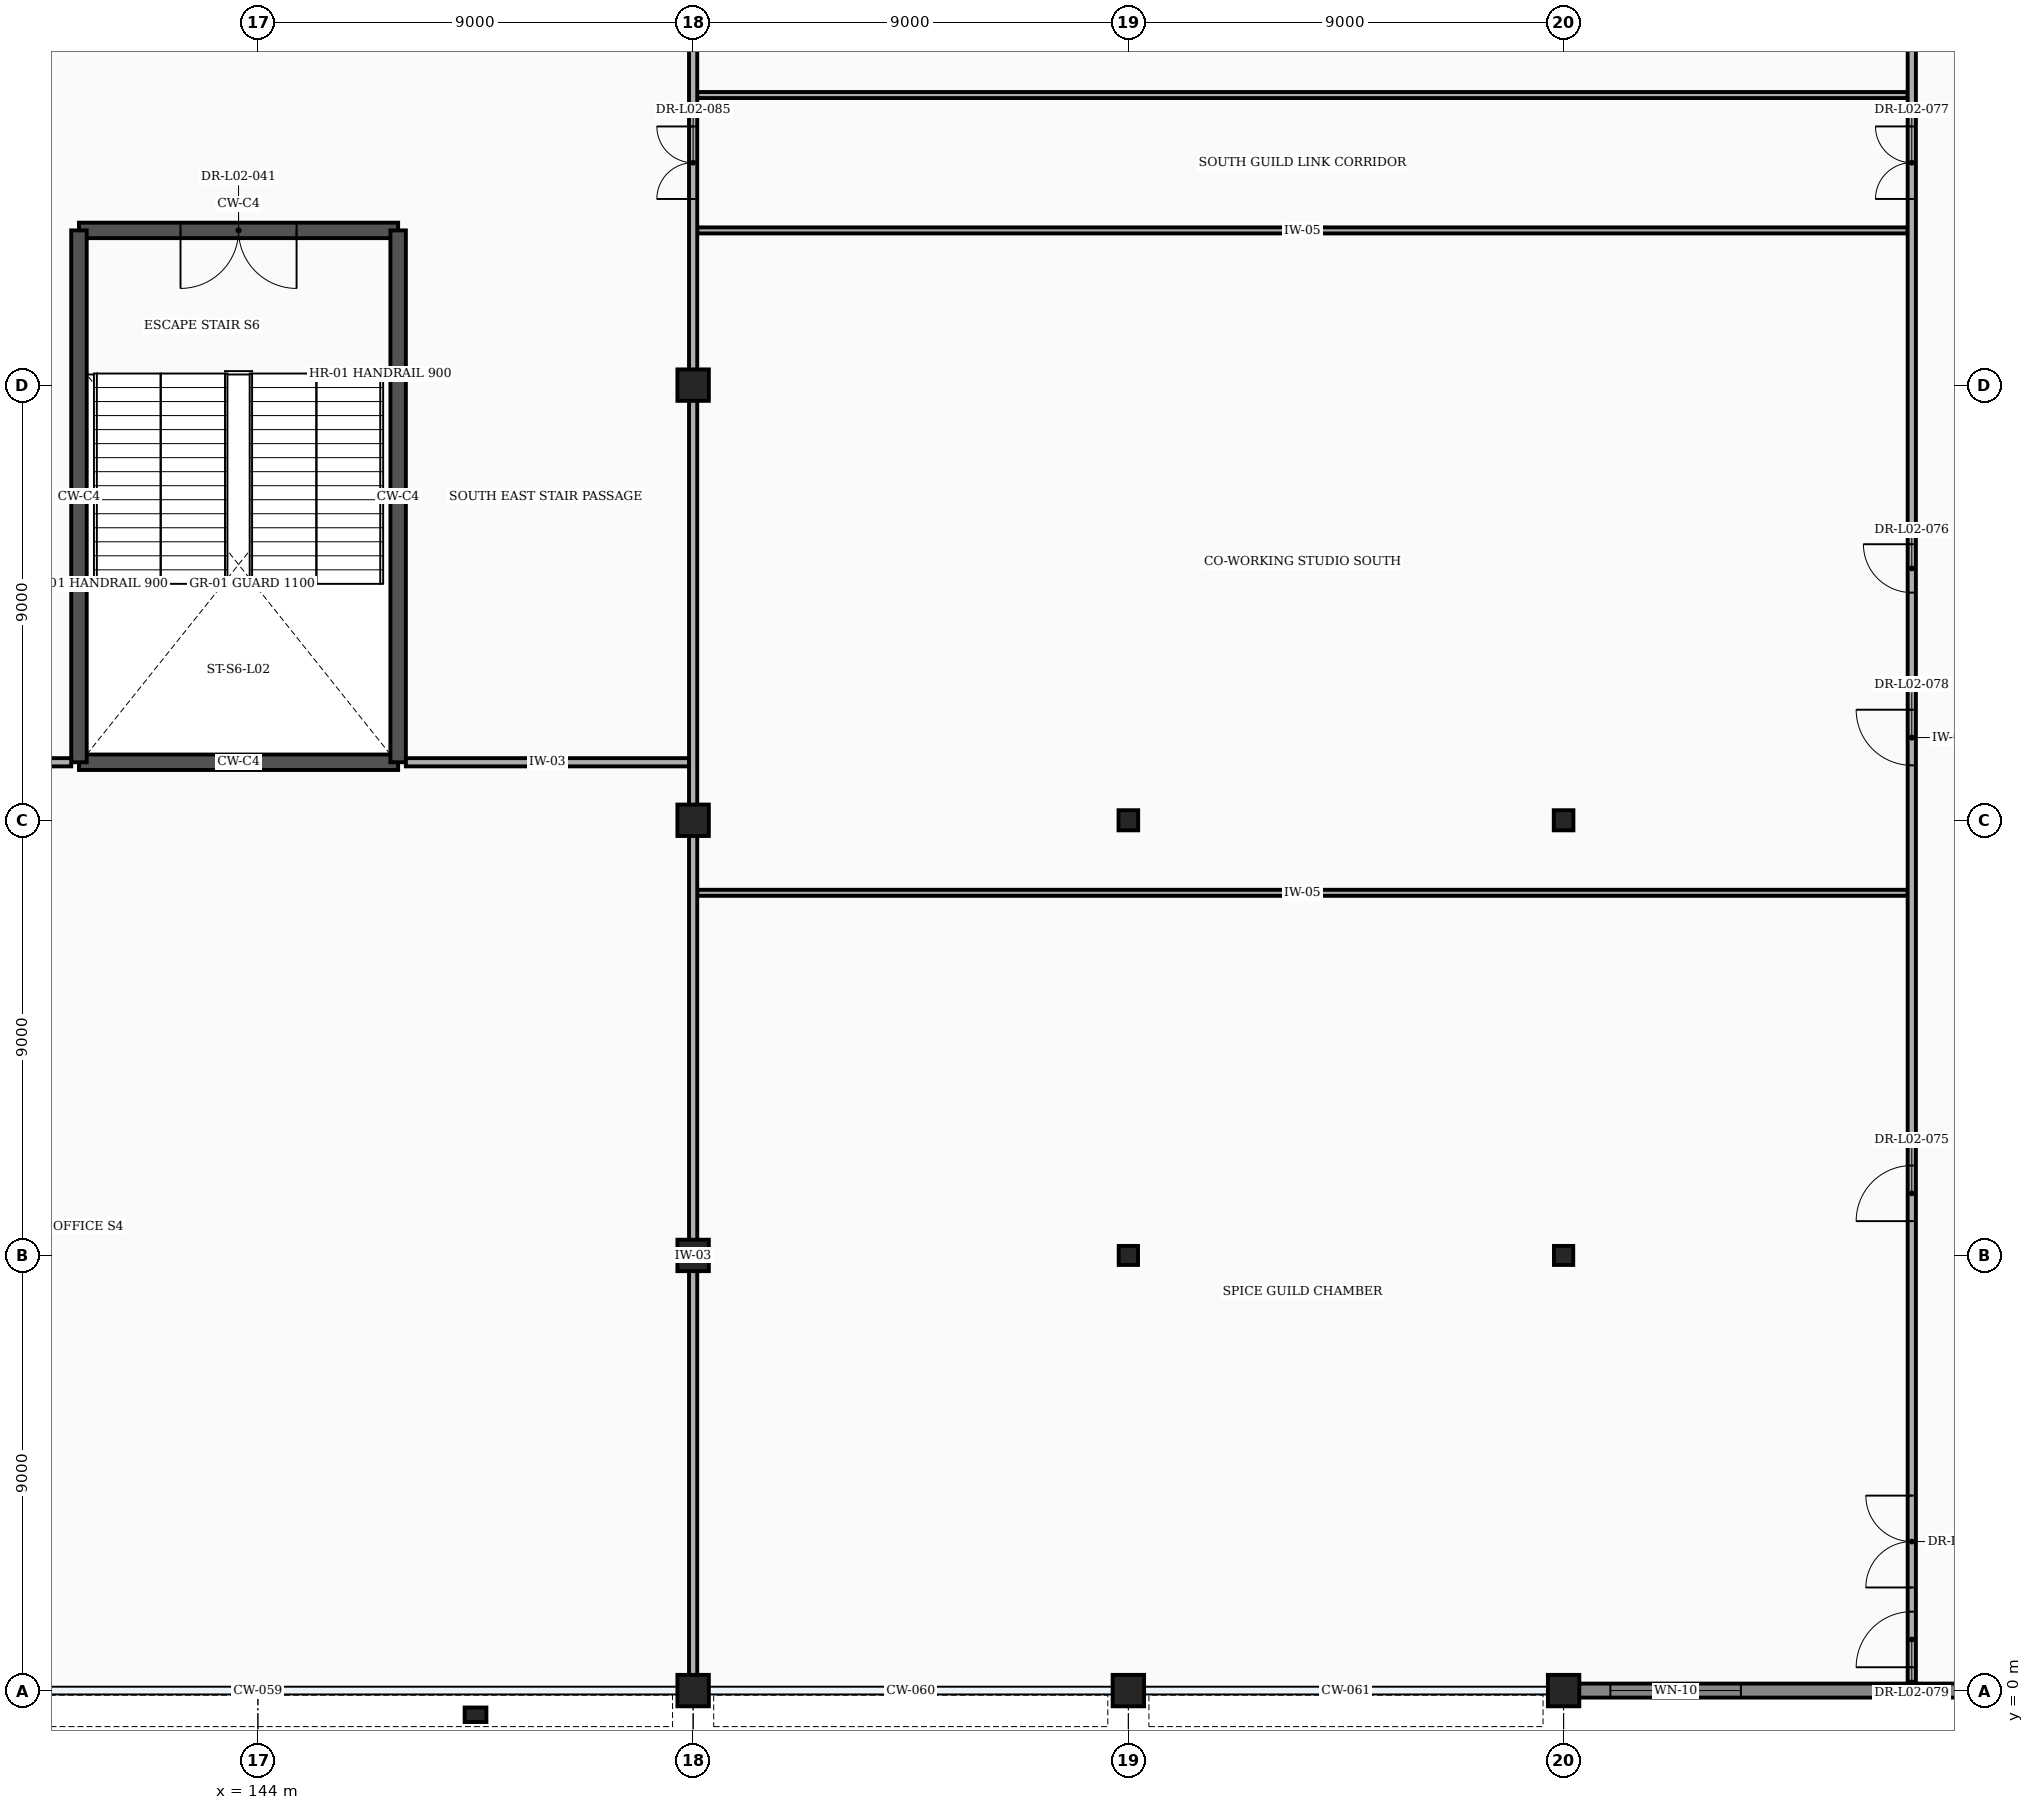
"""IFC4 building model, lengths in metres.
Left out: names, types, materials, properties, quantities, classifications, styles, units other than length and angle.
Written with IfcOpenShell. Run it as: python <this file> out.ifc"""

import sys

from ifc_helpers import new_model, si_unit, direction, frame, frame_2d, origin, origin_2d, place, context, subcontext, project, spatial, rectangle, i_section, extrude, element, fill, save


model = new_model("IFC4")
c1 = context("Model", 3, precision=1e-05, world=origin(), true_north=direction((0.0, 1.0)))
c2 = subcontext(c1, "Body", "Model", "MODEL_VIEW")
j1 = project(units=[si_unit("LENGTHUNIT", "METRE"), si_unit("PLANEANGLEUNIT", "RADIAN")], contexts=[c1])
p1 = place(None, origin())
s1 = spatial("IfcSite", under=j1, at=p1, CompositionType="ELEMENT")
p2 = place(p1, origin())
s2 = spatial("IfcBuilding", under=s1, at=p2, CompositionType="ELEMENT")
p3 = place(p2, frame((0.0, 0.0, 11.4)))
s3 = spatial("IfcBuildingStorey", under=s2, at=p3, CompositionType="ELEMENT", Elevation=11.4)
for number, where, z_axis, x_axis in (
    (1, (153.0, 0.0, 0.0), (0.0, 0.0, 1.0), (1.0, 0.0, 0.0)),
    (2, (153.0, 9.0, 0.0), (0.0, 0.0, 1.0), (1.0, 0.0, 0.0)),
    (3, (153.0, 18.0, 0.0), (0.0, 0.0, 1.0), (1.0, 0.0, 0.0)),
    (4, (153.0, 27.0, 0.0), (0.0, 0.0, 1.0), (1.0, 0.0, 0.0)),
    (5, (162.0, 0.0, 0.0), (0.0, 0.0, 1.0), (1.0, 0.0, 0.0)),
):
    element("IfcColumn", number, at=place(p3, frame(where, z_axis=z_axis, x_axis=x_axis)), inside=s3, PredefinedType="COLUMN", context=c2, shape_type="SweptSolid", body=[
        extrude(rectangle(XDim=0.65, YDim=0.65, at=origin_2d()), origin(), (0.0, 0.0, 1.0), 5.4),
    ])
p4 = place(p3, frame((162.0, 9.0, 0.0), z_axis=(0.0, 0.0, 1.0), x_axis=(1.0, 0.0, 0.0)))
e6 = element("IfcColumn", 6, at=p4, inside=s3, PredefinedType="COLUMN", context=c2, shape_type="SweptSolid", body=[
    extrude(i_section(OverallWidth=0.399, OverallDepth=0.394, WebThickness=0.023, FlangeThickness=0.037, at=origin_2d()), origin(), (0.0, 0.0, 1.0), 5.4),
])
p5 = place(p3, frame((162.0, 18.0, 0.0), z_axis=(0.0, 0.0, 1.0), x_axis=(1.0, 0.0, 0.0)))
e7 = element("IfcColumn", 7, at=p5, inside=s3, PredefinedType="COLUMN", context=c2, shape_type="SweptSolid", body=[
    extrude(i_section(OverallWidth=0.406, OverallDepth=0.416, WebThickness=0.03, FlangeThickness=0.048, at=origin_2d()), origin(), (0.0, 0.0, 1.0), 5.4),
])
p6 = place(p3, frame((171.0, 0.0, 0.0), z_axis=(0.0, 0.0, 1.0), x_axis=(1.0, 0.0, 0.0)))
e8 = element("IfcColumn", 8, at=p6, inside=s3, PredefinedType="COLUMN", context=c2, shape_type="SweptSolid", body=[
    extrude(rectangle(XDim=0.65, YDim=0.65, at=origin_2d()), origin(), (0.0, 0.0, 1.0), 5.4),
])
p7 = place(p3, frame((171.0, 9.0, 0.0), z_axis=(0.0, 0.0, 1.0), x_axis=(1.0, 0.0, 0.0)))
e9 = element("IfcColumn", 9, at=p7, inside=s3, PredefinedType="COLUMN", context=c2, shape_type="SweptSolid", body=[
    extrude(i_section(OverallWidth=0.399, OverallDepth=0.394, WebThickness=0.023, FlangeThickness=0.037, at=origin_2d()), origin(), (0.0, 0.0, 1.0), 5.4),
])
p8 = place(p3, frame((171.0, 18.0, 0.0), z_axis=(0.0, 0.0, 1.0), x_axis=(1.0, 0.0, 0.0)))
e10 = element("IfcColumn", 10, at=p8, inside=s3, PredefinedType="COLUMN", context=c2, shape_type="SweptSolid", body=[
    extrude(i_section(OverallWidth=0.406, OverallDepth=0.416, WebThickness=0.03, FlangeThickness=0.048, at=origin_2d()), origin(), (0.0, 0.0, 1.0), 5.4),
])
p9 = place(p3, frame((148.5, -0.5, 0.0), z_axis=(0.0, 0.0, 1.0), x_axis=(1.0, 0.0, 0.0)))
e11 = element("IfcColumn", 11, at=p9, inside=s3, PredefinedType="PILASTER", context=c2, shape_type="SweptSolid", body=[
    extrude(rectangle(XDim=0.45, YDim=0.3, at=origin_2d()), origin(), (0.0, 0.0, 1.0), 5.4),
])
p10 = place(p3, frame((171.317, 0.0, 0.0), z_axis=(0.0, 0.0, 1.0), x_axis=(1.0, 0.0, 0.0)))
e12 = element("IfcWall", 12, at=p10, inside=s3, PredefinedType="STANDARD", context=c2, shape_type="SweptSolid", body=[
    extrude(rectangle(XDim=17.366, YDim=0.29, at=frame_2d((8.683, 0.0))), origin(), (0.0, 0.0, 1.0), 4.388),
])
p11 = place(p10, frame((0.65, 0.0, 0.85)))
e13 = element("IfcOpeningElement", 13, at=p11, cuts=e12, PredefinedType="OPENING", context=c2, shape_type="SweptSolid", body=[
    extrude(rectangle(XDim=2.7, YDim=2.4, at=frame_2d((1.35, 1.2))), frame((0.0, 0.157, 0.0), z_axis=(0.0, -1.0, 0.0), x_axis=(1.0, 0.0, 0.0)), (0.0, 0.0, 1.0), 0.314),
])
p12 = place(p3, frame((140.3, 19.2, 0.0), z_axis=(0.0, 0.0, 1.0), x_axis=(1.0, 0.0, 0.0)))
e14 = element("IfcWall", 14, at=p12, inside=s3, PredefinedType="SHEAR", context=c2, shape_type="SweptSolid", body=[
    extrude(rectangle(XDim=6.6, YDim=0.32, at=frame_2d((3.3, 0.0))), origin(), (0.0, 0.0, 1.0), 5.15),
])
p13 = place(p3, frame((140.3, 30.2, 0.0), z_axis=(0.0, 0.0, 1.0), x_axis=(1.0, 0.0, 0.0)))
e15 = element("IfcWall", 15, at=p13, inside=s3, PredefinedType="SHEAR", context=c2, shape_type="SweptSolid", body=[
    extrude(rectangle(XDim=6.6, YDim=0.32, at=frame_2d((3.3, 0.0))), origin(), (0.0, 0.0, 1.0), 5.15),
])
p14 = place(p13, frame((2.1, 0.0, 0.0)))
e16 = element("IfcOpeningElement", 16, at=p14, cuts=e15, PredefinedType="OPENING", context=c2, shape_type="SweptSolid", body=[
    extrude(rectangle(XDim=2.4, YDim=2.25, at=frame_2d((1.2, 1.125))), frame((0.0, 0.172, 0.0), z_axis=(0.0, -1.0, 0.0), x_axis=(1.0, 0.0, 0.0)), (0.0, 0.0, 1.0), 0.344),
])
for number, where, z_axis, x_axis in (
    (17, (140.3, 19.2, 0.0), (0.0, 0.0, 1.0), (0.0, 1.0, 0.0)),
    (18, (146.9, 19.2, 0.0), (0.0, 0.0, 1.0), (0.0, 1.0, 0.0)),
):
    element("IfcWall", number, at=place(p3, frame(where, z_axis=z_axis, x_axis=x_axis)), inside=s3, PredefinedType="SHEAR", context=c2, shape_type="SweptSolid", body=[
        extrude(rectangle(XDim=11.0, YDim=0.32, at=frame_2d((5.5, 0.0))), origin(), (0.0, 0.0, 1.0), 5.15),
    ])
for number, where, z_axis, x_axis in (
    (19, (153.085, 16.5, 0.0), (0.0, 0.0, 1.0), (1.0, 0.0, 0.0)),
    (20, (153.085, 30.2, 0.0), (0.0, 0.0, 1.0), (1.0, 0.0, 0.0)),
    (21, (153.085, 33.0, 0.0), (0.0, 0.0, 1.0), (1.0, 0.0, 0.0)),
):
    element("IfcWall", number, at=place(p3, frame(where, z_axis=z_axis, x_axis=x_axis)), inside=s3, PredefinedType="PARTITIONING", context=c2, shape_type="SweptSolid", body=[
        extrude(rectangle(XDim=25.03, YDim=0.125, at=frame_2d((12.515, 0.0))), origin(), (0.0, 0.0, 1.0), 5.15),
    ])
p15 = place(p3, frame((178.2, 0.183, 0.0), z_axis=(0.0, 0.0, 1.0), x_axis=(0.0, 1.0, 0.0)))
e22 = element("IfcWall", 22, at=p15, inside=s3, PredefinedType="PARTITIONING", context=c2, shape_type="SweptSolid", body=[
    extrude(rectangle(XDim=39.057, YDim=0.17, at=frame_2d((19.529, 0.0))), origin(), (0.0, 0.0, 1.0), 5.15),
])
p16 = place(p15, frame((9.527, 0.0, 0.0)))
e23 = element("IfcOpeningElement", 23, at=p16, cuts=e22, PredefinedType="OPENING", context=c2, shape_type="SweptSolid", body=[
    extrude(rectangle(XDim=1.15, YDim=2.15, at=frame_2d((0.575, 1.075))), frame((0.0, 0.097, 0.0), z_axis=(0.0, -1.0, 0.0), x_axis=(1.0, 0.0, 0.0)), (0.0, 0.0, 1.0), 0.194),
])
p17 = place(p15, frame((22.527, 0.0, 0.0)))
e24 = element("IfcOpeningElement", 24, at=p17, cuts=e22, PredefinedType="OPENING", context=c2, shape_type="SweptSolid", body=[
    extrude(rectangle(XDim=1.0, YDim=2.15, at=frame_2d((0.5, 1.075))), frame((0.0, 0.097, 0.0), z_axis=(0.0, -1.0, 0.0), x_axis=(1.0, 0.0, 0.0)), (0.0, 0.0, 1.0), 0.194),
])
p18 = place(p15, frame((30.668, 0.0, 0.0)))
e25 = element("IfcOpeningElement", 25, at=p18, cuts=e22, PredefinedType="OPENING", context=c2, shape_type="SweptSolid", body=[
    extrude(rectangle(XDim=1.5, YDim=2.2, at=frame_2d((0.75, 1.1))), frame((0.0, 0.097, 0.0), z_axis=(0.0, -1.0, 0.0), x_axis=(1.0, 0.0, 0.0)), (0.0, 0.0, 1.0), 0.194),
])
p19 = place(p15, frame((18.954, 0.0, 0.0)))
e26 = element("IfcOpeningElement", 26, at=p19, cuts=e22, PredefinedType="OPENING", context=c2, shape_type="SweptSolid", body=[
    extrude(rectangle(XDim=1.15, YDim=2.15, at=frame_2d((0.575, 1.075))), frame((0.0, 0.097, 0.0), z_axis=(0.0, -1.0, 0.0), x_axis=(1.0, 0.0, 0.0)), (0.0, 0.0, 1.0), 0.194),
])
p20 = place(p15, frame((0.3, 0.0, 0.0)))
e27 = element("IfcOpeningElement", 27, at=p20, cuts=e22, PredefinedType="OPENING", context=c2, shape_type="SweptSolid", body=[
    extrude(rectangle(XDim=1.15, YDim=2.15, at=frame_2d((0.575, 1.075))), frame((0.0, 0.097, 0.0), z_axis=(0.0, -1.0, 0.0), x_axis=(1.0, 0.0, 0.0)), (0.0, 0.0, 1.0), 0.194),
])
p21 = place(p15, frame((37.758, 0.0, 0.0)))
e28 = element("IfcOpeningElement", 28, at=p21, cuts=e22, PredefinedType="OPENING", context=c2, shape_type="SweptSolid", body=[
    extrude(rectangle(XDim=1.0, YDim=2.15, at=frame_2d((0.5, 1.075))), frame((0.0, 0.097, 0.0), z_axis=(0.0, -1.0, 0.0), x_axis=(1.0, 0.0, 0.0)), (0.0, 0.0, 1.0), 0.194),
])
p22 = place(p15, frame((1.95, 0.0, 0.0)))
e29 = element("IfcOpeningElement", 29, at=p22, cuts=e22, PredefinedType="OPENING", context=c2, shape_type="SweptSolid", body=[
    extrude(rectangle(XDim=1.9, YDim=2.35, at=frame_2d((0.95, 1.175))), frame((0.0, 0.097, 0.0), z_axis=(0.0, -1.0, 0.0), x_axis=(1.0, 0.0, 0.0)), (0.0, 0.0, 1.0), 0.194),
])
p23 = place(p3, frame((153.0, 0.22, 0.0), z_axis=(0.0, 0.0, 1.0), x_axis=(0.0, 1.0, 0.0)))
e30 = element("IfcWall", 30, at=p23, inside=s3, PredefinedType="PARTITIONING", context=c2, shape_type="SweptSolid", body=[
    extrude(rectangle(XDim=17.56, YDim=0.17, at=frame_2d((8.78, 0.0))), origin(), (0.0, 0.0, 1.0), 4.609),
])
p24 = place(p3, frame((153.0, 18.22, 0.0), z_axis=(0.0, 0.0, 1.0), x_axis=(0.0, 1.0, 0.0)))
e31 = element("IfcWall", 31, at=p24, inside=s3, PredefinedType="PARTITIONING", context=c2, shape_type="SweptSolid", body=[
    extrude(rectangle(XDim=8.56, YDim=0.17, at=frame_2d((4.28, 0.0))), origin(), (0.0, 0.0, 1.0), 4.617),
])
p25 = place(p3, frame((153.0, 27.22, 0.0), z_axis=(0.0, 0.0, 1.0), x_axis=(0.0, 1.0, 0.0)))
e32 = element("IfcWall", 32, at=p25, inside=s3, PredefinedType="PARTITIONING", context=c2, shape_type="SweptSolid", body=[
    extrude(rectangle(XDim=8.56, YDim=0.17, at=frame_2d((4.28, 0.0))), origin(), (0.0, 0.0, 1.0), 4.617),
])
p26 = place(p25, frame((3.63, 0.0, 0.0)))
e33 = element("IfcOpeningElement", 33, at=p26, cuts=e32, PredefinedType="OPENING", context=c2, shape_type="SweptSolid", body=[
    extrude(rectangle(XDim=1.5, YDim=2.2, at=frame_2d((0.75, 1.1))), frame((0.0, 0.097, 0.0), z_axis=(0.0, -1.0, 0.0), x_axis=(1.0, 0.0, 0.0)), (0.0, 0.0, 1.0), 0.194),
])
p27 = place(p3, frame((133.8, 19.2, 0.0), z_axis=(0.0, 0.0, 1.0), x_axis=(1.0, 0.0, 0.0)))
e34 = element("IfcWall", 34, at=p27, inside=s3, PredefinedType="PARTITIONING", context=c2, shape_type="SweptSolid", body=[
    extrude(rectangle(XDim=6.34, YDim=0.17, at=frame_2d((3.17, 0.0))), origin(), (0.0, 0.0, 1.0), 5.15),
])
p28 = place(p27, frame((2.67, 0.0, 0.0)))
e35 = element("IfcOpeningElement", 35, at=p28, cuts=e34, PredefinedType="OPENING", context=c2, shape_type="SweptSolid", body=[
    extrude(rectangle(XDim=1.0, YDim=2.15, at=frame_2d((0.5, 1.075))), frame((0.0, 0.097, 0.0), z_axis=(0.0, -1.0, 0.0), x_axis=(1.0, 0.0, 0.0)), (0.0, 0.0, 1.0), 0.194),
])
p29 = place(p3, frame((147.06, 19.2, 0.0), z_axis=(0.0, 0.0, 1.0), x_axis=(1.0, 0.0, 0.0)))
e36 = element("IfcWall", 36, at=p29, inside=s3, PredefinedType="PARTITIONING", context=c2, shape_type="SweptSolid", body=[
    extrude(rectangle(XDim=5.855, YDim=0.17, at=frame_2d((2.927, 0.0))), origin(), (0.0, 0.0, 1.0), 5.15),
])
p30 = place(p11, origin())
e37 = element("IfcWindow", 37, at=p30, inside=s3, PartitioningType="SINGLE_PANEL", PredefinedType="WINDOW", context=c2, shape_type="SweptSolid", body=[
    extrude(rectangle(XDim=2.7, YDim=2.4, at=frame_2d((1.35, 1.2))), frame((0.0, 0.03, 0.0), z_axis=(0.0, -1.0, 0.0), x_axis=(1.0, 0.0, 0.0)), (0.0, 0.0, 1.0), 0.06),
])
fill(e13, e37)
p31 = place(p14, frame((2.4, 0.0, 0.0), z_axis=(0.0, 0.0, 1.0), x_axis=(-1.0, 0.0, 0.0)))
e38 = element("IfcDoor", 38, at=p31, inside=s3, OperationType="DOUBLE_DOOR_SINGLE_SWING", PredefinedType="DOOR", context=c2, shape_type="SweptSolid", body=[
    extrude(rectangle(XDim=2.4, YDim=2.25, at=frame_2d((1.2, 1.125))), frame((0.0, 0.025, 0.0), z_axis=(0.0, -1.0, 0.0), x_axis=(1.0, 0.0, 0.0)), (0.0, 0.0, 1.0), 0.05),
])
fill(e16, e38)
p32 = place(p16, origin())
e39 = element("IfcDoor", 39, at=p32, inside=s3, OperationType="SINGLE_SWING_LEFT", PredefinedType="DOOR", context=c2, shape_type="SweptSolid", body=[
    extrude(rectangle(XDim=1.15, YDim=2.15, at=frame_2d((0.575, 1.075))), frame((0.0, 0.025, 0.0), z_axis=(0.0, -1.0, 0.0), x_axis=(1.0, 0.0, 0.0)), (0.0, 0.0, 1.0), 0.05),
])
fill(e23, e39)
p33 = place(p17, origin())
e40 = element("IfcDoor", 40, at=p33, inside=s3, OperationType="SINGLE_SWING_RIGHT", PredefinedType="DOOR", context=c2, shape_type="SweptSolid", body=[
    extrude(rectangle(XDim=1.0, YDim=2.15, at=frame_2d((0.5, 1.075))), frame((0.0, 0.025, 0.0), z_axis=(0.0, -1.0, 0.0), x_axis=(1.0, 0.0, 0.0)), (0.0, 0.0, 1.0), 0.05),
])
fill(e24, e40)
p34 = place(p18, origin())
e41 = element("IfcDoor", 41, at=p34, inside=s3, OperationType="DOUBLE_DOOR_SINGLE_SWING", PredefinedType="DOOR", context=c2, shape_type="SweptSolid", body=[
    extrude(rectangle(XDim=1.5, YDim=2.2, at=frame_2d((0.75, 1.1))), frame((0.0, 0.025, 0.0), z_axis=(0.0, -1.0, 0.0), x_axis=(1.0, 0.0, 0.0)), (0.0, 0.0, 1.0), 0.05),
])
fill(e25, e41)
p35 = place(p19, origin())
e42 = element("IfcDoor", 42, at=p35, inside=s3, OperationType="SINGLE_SWING_RIGHT", PredefinedType="DOOR", context=c2, shape_type="SweptSolid", body=[
    extrude(rectangle(XDim=1.15, YDim=2.15, at=frame_2d((0.575, 1.075))), frame((0.0, 0.025, 0.0), z_axis=(0.0, -1.0, 0.0), x_axis=(1.0, 0.0, 0.0)), (0.0, 0.0, 1.0), 0.05),
])
fill(e26, e42)
p36 = place(p20, origin())
e43 = element("IfcDoor", 43, at=p36, inside=s3, OperationType="SINGLE_SWING_LEFT", PredefinedType="DOOR", context=c2, shape_type="SweptSolid", body=[
    extrude(rectangle(XDim=1.15, YDim=2.15, at=frame_2d((0.575, 1.075))), frame((0.0, 0.025, 0.0), z_axis=(0.0, -1.0, 0.0), x_axis=(1.0, 0.0, 0.0)), (0.0, 0.0, 1.0), 0.05),
])
fill(e27, e43)
p37 = place(p22, origin())
e44 = element("IfcDoor", 44, at=p37, inside=s3, OperationType="DOUBLE_DOOR_SINGLE_SWING", PredefinedType="DOOR", context=c2, shape_type="SweptSolid", body=[
    extrude(rectangle(XDim=1.9, YDim=2.35, at=frame_2d((0.95, 1.175))), frame((0.0, 0.025, 0.0), z_axis=(0.0, -1.0, 0.0), x_axis=(1.0, 0.0, 0.0)), (0.0, 0.0, 1.0), 0.05),
])
fill(e29, e44)
p38 = place(p26, origin())
e45 = element("IfcDoor", 45, at=p38, inside=s3, OperationType="DOUBLE_DOOR_SINGLE_SWING", PredefinedType="DOOR", context=c2, shape_type="SweptSolid", body=[
    extrude(rectangle(XDim=1.5, YDim=2.2, at=frame_2d((0.75, 1.1))), frame((0.0, 0.025, 0.0), z_axis=(0.0, -1.0, 0.0), x_axis=(1.0, 0.0, 0.0)), (0.0, 0.0, 1.0), 0.05),
])
fill(e33, e45)
save(model, sys.argv[1])
